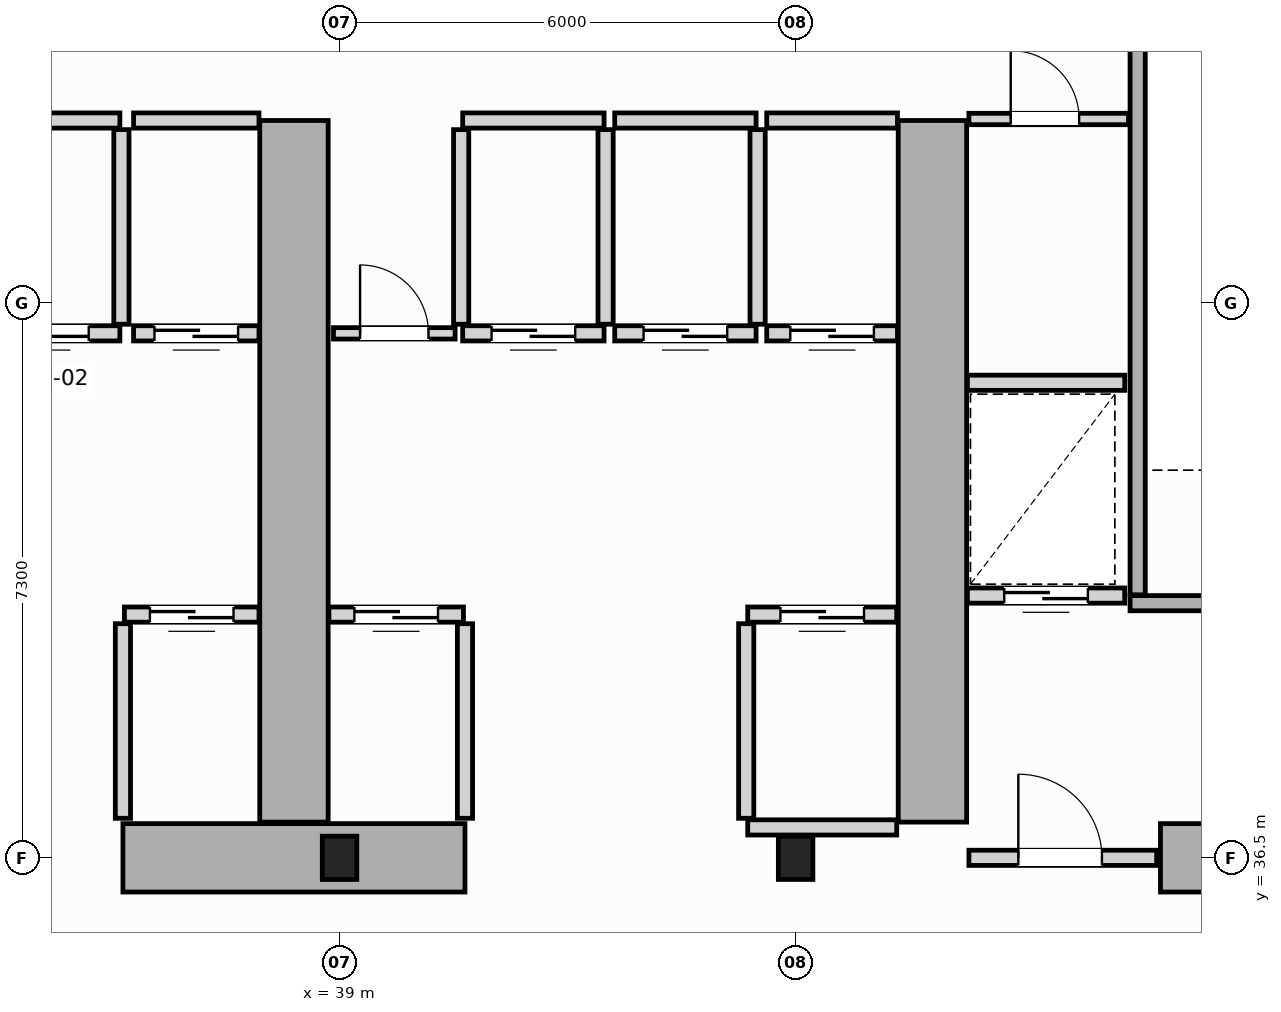
"""IFC4 building model, lengths in metres.
Left out: names, types, materials, properties, quantities, classifications, styles, units other than length and angle.
Written with IfcOpenShell. Run it as: python <this file> out.ifc"""

import sys

from ifc_helpers import new_model, si_unit, direction, frame, frame_2d, origin, origin_2d, place, context, subcontext, project, spatial, rectangle, i_section, extrude, source, transform, mapped, element, fill, save


model = new_model("IFC4")
c1 = context("Model", 3, precision=1e-05, world=origin(), true_north=direction((0.0, 1.0)))
c2 = subcontext(c1, "Body", "Model", "MODEL_VIEW")
j1 = project(units=[si_unit("LENGTHUNIT", "METRE"), si_unit("PLANEANGLEUNIT", "RADIAN")], contexts=[c1])
p1 = place(None, origin())
s1 = spatial("IfcSite", under=j1, at=p1, CompositionType="ELEMENT")
p2 = place(p1, origin())
s2 = spatial("IfcBuilding", under=s1, at=p2, CompositionType="ELEMENT")
p3 = place(p2, origin())
s3 = spatial("IfcBuildingStorey", under=s2, at=p3, CompositionType="ELEMENT", Elevation=0.0)
m1 = source(origin(), c2, "Body", "SweptSolid", [
    extrude(i_section(OverallWidth=0.454, OverallDepth=0.569, WebThickness=0.078, FlangeThickness=0.08, FilletRadius=0.015, at=origin_2d()), origin(), (0.0, 0.0, 1.0), 5.6),
])
for number, where, z_axis, x_axis in (
    (1, (39.0, 36.5, 0.0), (0.0, 0.0, 1.0), (1.0, 0.0, 0.0)),
    (2, (45.0, 36.5, 0.0), (0.0, 0.0, 1.0), (1.0, 0.0, 0.0)),
):
    element("IfcColumn", number, at=place(p3, frame(where, z_axis=z_axis, x_axis=x_axis)), inside=s3, PredefinedType="COLUMN", context=c2, shape_type="MappedRepresentation", body=[
        mapped(m1, transform((0.0, 0.0, 0.0), scale=1.0)),
    ])
p4 = place(p3, frame((36.15, 36.5, 0.0), z_axis=(0.0, 0.0, 1.0), x_axis=(1.0, 0.0, 0.0)))
e3 = element("IfcWall", 3, at=p4, inside=s3, PredefinedType="SHEAR", context=c2, shape_type="SweptSolid", body=[
    extrude(rectangle(XDim=4.5, YDim=0.9, at=frame_2d((2.25, 0.0))), origin(), (0.0, 0.0, 1.0), 5.6),
])
p5 = place(p3, frame((49.8, 36.5, 0.0), z_axis=(0.0, 0.0, 1.0), x_axis=(1.0, 0.0, 0.0)))
e4 = element("IfcWall", 4, at=p5, inside=s3, PredefinedType="SHEAR", context=c2, shape_type="SweptSolid", body=[
    extrude(rectangle(XDim=3.73, YDim=0.9, at=frame_2d((1.865, 0.0))), origin(), (0.0, 0.0, 1.0), 4.12),
])
for number, where, z_axis, x_axis in (
    (5, (38.4, 36.97, 0.0), (0.0, 0.0, 1.0), (0.0, 1.0, 0.0)),
    (6, (46.8, 36.97, 0.0), (0.0, 0.0, 1.0), (0.0, 1.0, 0.0)),
):
    element("IfcWall", number, at=place(p3, frame(where, z_axis=z_axis, x_axis=x_axis)), inside=s3, PredefinedType="SHEAR", context=c2, shape_type="SweptSolid", body=[
        extrude(rectangle(XDim=9.23, YDim=0.9, at=frame_2d((4.615, 0.0))), origin(), (0.0, 0.0, 1.0), 5.6),
    ])
p6 = place(p3, frame((49.4, 39.85, 0.0), z_axis=(0.0, 0.0, 1.0), x_axis=(1.0, 0.0, 0.0)))
e7 = element("IfcWall", 7, at=p6, inside=s3, PredefinedType="SOLIDWALL", context=c2, shape_type="SweptSolid", body=[
    extrude(rectangle(XDim=4.15, YDim=0.2, at=frame_2d((2.075, 0.0))), origin(), (0.0, 0.0, 1.0), 5.6),
])
p7 = place(p6, frame((1.325, 0.0, 0.0)))
e8 = element("IfcOpeningElement", 8, at=p7, cuts=e7, PredefinedType="OPENING", context=c2, shape_type="SweptSolid", body=[
    extrude(rectangle(XDim=1.1, YDim=2.15, at=frame_2d((0.55, 1.075))), frame((0.0, 0.11, 0.0), z_axis=(0.0, -1.0, 0.0), x_axis=(1.0, 0.0, 0.0)), (0.0, 0.0, 1.0), 0.22),
])
p8 = place(p3, frame((49.5, 39.96, 0.0), z_axis=(0.0, 0.0, 1.0), x_axis=(0.0, 1.0, 0.0)))
e9 = element("IfcWall", 9, at=p8, inside=s3, PredefinedType="SOLIDWALL", context=c2, shape_type="SweptSolid", body=[
    extrude(rectangle(XDim=9.93, YDim=0.2, at=frame_2d((4.965, 0.0))), origin(), (0.0, 0.0, 1.0), 5.6),
])
p9 = place(p3, frame((47.28, 36.5, 0.0), z_axis=(0.0, 0.0, 1.0), x_axis=(1.0, 0.0, 0.0)))
e10 = element("IfcWall", 10, at=p9, inside=s3, PredefinedType="SOLIDWALL", context=c2, shape_type="SweptSolid", body=[
    extrude(rectangle(XDim=2.47, YDim=0.2, at=frame_2d((1.235, 0.0))), origin(), (0.0, 0.0, 1.0), 4.11),
])
p10 = place(p9, frame((0.65, 0.0, 0.0)))
e11 = element("IfcOpeningElement", 11, at=p10, cuts=e10, PredefinedType="OPENING", context=c2, shape_type="SweptSolid", body=[
    extrude(rectangle(XDim=1.1, YDim=2.15, at=frame_2d((0.55, 1.075))), frame((0.0, 0.11, 0.0), z_axis=(0.0, -1.0, 0.0), x_axis=(1.0, 0.0, 0.0)), (0.0, 0.0, 1.0), 0.22),
])
p11 = place(p3, frame((36.17, 39.7, 0.0), z_axis=(0.0, 0.0, 1.0), x_axis=(1.0, 0.0, 0.0)))
e12 = element("IfcWall", 12, at=p11, inside=s3, PredefinedType="SOLIDWALL", context=c2, shape_type="SweptSolid", body=[
    extrude(rectangle(XDim=1.77, YDim=0.2, at=frame_2d((0.885, 0.0))), origin(), (0.0, 0.0, 1.0), 5.32),
])
p12 = place(p11, frame((0.335, 0.0, 0.0)))
e13 = element("IfcOpeningElement", 13, at=p12, cuts=e12, PredefinedType="OPENING", context=c2, shape_type="SweptSolid", body=[
    extrude(rectangle(XDim=1.1, YDim=2.15, at=frame_2d((0.55, 1.075))), frame((0.0, 0.11, 0.0), z_axis=(0.0, -1.0, 0.0), x_axis=(1.0, 0.0, 0.0)), (0.0, 0.0, 1.0), 0.22),
])
p13 = place(p3, frame((36.15, 37.02, 0.0), z_axis=(0.0, 0.0, 1.0), x_axis=(0.0, 1.0, 0.0)))
e14 = element("IfcWall", 14, at=p13, inside=s3, PredefinedType="SOLIDWALL", context=c2, shape_type="SweptSolid", body=[
    extrude(rectangle(XDim=2.56, YDim=0.2, at=frame_2d((1.28, 0.0))), origin(), (0.0, 0.0, 1.0), 5.32),
])
p14 = place(p3, frame((34.19, 43.4, 0.0), z_axis=(0.0, 0.0, 1.0), x_axis=(1.0, 0.0, 0.0)))
e15 = element("IfcWall", 15, at=p14, inside=s3, PredefinedType="SOLIDWALL", context=c2, shape_type="SweptSolid", body=[
    extrude(rectangle(XDim=1.92, YDim=0.2, at=frame_2d((0.96, 0.0))), origin(), (0.0, 0.0, 1.0), 5.32),
])
p15 = place(p14, frame((0.41, 0.0, 0.0)))
e16 = element("IfcOpeningElement", 16, at=p15, cuts=e15, PredefinedType="OPENING", context=c2, shape_type="SweptSolid", body=[
    extrude(rectangle(XDim=1.1, YDim=2.15, at=frame_2d((0.55, 1.075))), frame((0.0, 0.11, 0.0), z_axis=(0.0, -1.0, 0.0), x_axis=(1.0, 0.0, 0.0)), (0.0, 0.0, 1.0), 0.22),
])
p16 = place(p3, frame((34.19, 46.2, 0.0), z_axis=(0.0, 0.0, 1.0), x_axis=(1.0, 0.0, 0.0)))
e17 = element("IfcWall", 17, at=p16, inside=s3, PredefinedType="SOLIDWALL", context=c2, shape_type="SweptSolid", body=[
    extrude(rectangle(XDim=1.92, YDim=0.2, at=frame_2d((0.96, 0.0))), origin(), (0.0, 0.0, 1.0), 5.32),
])
p17 = place(p3, frame((36.13, 43.52, 0.0), z_axis=(0.0, 0.0, 1.0), x_axis=(0.0, 1.0, 0.0)))
e18 = element("IfcWall", 18, at=p17, inside=s3, PredefinedType="SOLIDWALL", context=c2, shape_type="SweptSolid", body=[
    extrude(rectangle(XDim=2.56, YDim=0.2, at=frame_2d((1.28, 0.0))), origin(), (0.0, 0.0, 1.0), 5.32),
])
p18 = place(p3, frame((36.29, 43.4, 0.0), z_axis=(0.0, 0.0, 1.0), x_axis=(1.0, 0.0, 0.0)))
e19 = element("IfcWall", 19, at=p18, inside=s3, PredefinedType="SOLIDWALL", context=c2, shape_type="SweptSolid", body=[
    extrude(rectangle(XDim=1.65, YDim=0.2, at=frame_2d((0.825, 0.0))), origin(), (0.0, 0.0, 1.0), 5.32),
])
p19 = place(p18, frame((0.275, 0.0, 0.0)))
e20 = element("IfcOpeningElement", 20, at=p19, cuts=e19, PredefinedType="OPENING", context=c2, shape_type="SweptSolid", body=[
    extrude(rectangle(XDim=1.1, YDim=2.15, at=frame_2d((0.55, 1.075))), frame((0.0, 0.11, 0.0), z_axis=(0.0, -1.0, 0.0), x_axis=(1.0, 0.0, 0.0)), (0.0, 0.0, 1.0), 0.22),
])
p20 = place(p3, frame((36.29, 46.2, 0.0), z_axis=(0.0, 0.0, 1.0), x_axis=(1.0, 0.0, 0.0)))
e21 = element("IfcWall", 21, at=p20, inside=s3, PredefinedType="SOLIDWALL", context=c2, shape_type="SweptSolid", body=[
    extrude(rectangle(XDim=1.65, YDim=0.2, at=frame_2d((0.825, 0.0))), origin(), (0.0, 0.0, 1.0), 5.32),
])
p21 = place(p3, frame((38.86, 39.7, 0.0), z_axis=(0.0, 0.0, 1.0), x_axis=(1.0, 0.0, 0.0)))
e22 = element("IfcWall", 22, at=p21, inside=s3, PredefinedType="SOLIDWALL", context=c2, shape_type="SweptSolid", body=[
    extrude(rectangle(XDim=1.77, YDim=0.2, at=frame_2d((0.885, 0.0))), origin(), (0.0, 0.0, 1.0), 5.32),
])
p22 = place(p21, frame((0.335, 0.0, 0.0)))
e23 = element("IfcOpeningElement", 23, at=p22, cuts=e22, PredefinedType="OPENING", context=c2, shape_type="SweptSolid", body=[
    extrude(rectangle(XDim=1.1, YDim=2.15, at=frame_2d((0.55, 1.075))), frame((0.0, 0.11, 0.0), z_axis=(0.0, -1.0, 0.0), x_axis=(1.0, 0.0, 0.0)), (0.0, 0.0, 1.0), 0.22),
])
p23 = place(p3, frame((40.65, 37.02, 0.0), z_axis=(0.0, 0.0, 1.0), x_axis=(0.0, 1.0, 0.0)))
e24 = element("IfcWall", 24, at=p23, inside=s3, PredefinedType="SOLIDWALL", context=c2, shape_type="SweptSolid", body=[
    extrude(rectangle(XDim=2.56, YDim=0.2, at=frame_2d((1.28, 0.0))), origin(), (0.0, 0.0, 1.0), 5.32),
])
p24 = place(p3, frame((44.37, 39.7, 0.0), z_axis=(0.0, 0.0, 1.0), x_axis=(1.0, 0.0, 0.0)))
e25 = element("IfcWall", 25, at=p24, inside=s3, PredefinedType="SOLIDWALL", context=c2, shape_type="SweptSolid", body=[
    extrude(rectangle(XDim=1.96, YDim=0.2, at=frame_2d((0.98, 0.0))), origin(), (0.0, 0.0, 1.0), 5.32),
])
p25 = place(p24, frame((0.43, 0.0, 0.0)))
e26 = element("IfcOpeningElement", 26, at=p25, cuts=e25, PredefinedType="OPENING", context=c2, shape_type="SweptSolid", body=[
    extrude(rectangle(XDim=1.1, YDim=2.15, at=frame_2d((0.55, 1.075))), frame((0.0, 0.11, 0.0), z_axis=(0.0, -1.0, 0.0), x_axis=(1.0, 0.0, 0.0)), (0.0, 0.0, 1.0), 0.22),
])
p26 = place(p3, frame((44.37, 36.9, 0.0), z_axis=(0.0, 0.0, 1.0), x_axis=(1.0, 0.0, 0.0)))
e27 = element("IfcWall", 27, at=p26, inside=s3, PredefinedType="SOLIDWALL", context=c2, shape_type="SweptSolid", body=[
    extrude(rectangle(XDim=1.96, YDim=0.2, at=frame_2d((0.98, 0.0))), origin(), (0.0, 0.0, 1.0), 4.11),
])
p27 = place(p3, frame((44.35, 37.02, 0.0), z_axis=(0.0, 0.0, 1.0), x_axis=(0.0, 1.0, 0.0)))
e28 = element("IfcWall", 28, at=p27, inside=s3, PredefinedType="SOLIDWALL", context=c2, shape_type="SweptSolid", body=[
    extrude(rectangle(XDim=2.56, YDim=0.2, at=frame_2d((1.28, 0.0))), origin(), (0.0, 0.0, 1.0), 5.32),
])
p28 = place(p3, frame((40.62, 43.4, 0.0), z_axis=(0.0, 0.0, 1.0), x_axis=(1.0, 0.0, 0.0)))
e29 = element("IfcWall", 29, at=p28, inside=s3, PredefinedType="SOLIDWALL", context=c2, shape_type="SweptSolid", body=[
    extrude(rectangle(XDim=1.86, YDim=0.2, at=frame_2d((0.93, 0.0))), origin(), (0.0, 0.0, 1.0), 5.32),
])
p29 = place(p28, frame((0.38, 0.0, 0.0)))
e30 = element("IfcOpeningElement", 30, at=p29, cuts=e29, PredefinedType="OPENING", context=c2, shape_type="SweptSolid", body=[
    extrude(rectangle(XDim=1.1, YDim=2.15, at=frame_2d((0.55, 1.075))), frame((0.0, 0.11, 0.0), z_axis=(0.0, -1.0, 0.0), x_axis=(1.0, 0.0, 0.0)), (0.0, 0.0, 1.0), 0.22),
])
p30 = place(p3, frame((40.62, 46.2, 0.0), z_axis=(0.0, 0.0, 1.0), x_axis=(1.0, 0.0, 0.0)))
e31 = element("IfcWall", 31, at=p30, inside=s3, PredefinedType="SOLIDWALL", context=c2, shape_type="SweptSolid", body=[
    extrude(rectangle(XDim=1.86, YDim=0.2, at=frame_2d((0.93, 0.0))), origin(), (0.0, 0.0, 1.0), 5.32),
])
for number, where, z_axis, x_axis in (
    (32, (40.6, 43.52, 0.0), (0.0, 0.0, 1.0), (0.0, 1.0, 0.0)),
    (33, (42.5, 43.52, 0.0), (0.0, 0.0, 1.0), (0.0, 1.0, 0.0)),
):
    element("IfcWall", number, at=place(p3, frame(where, z_axis=z_axis, x_axis=x_axis)), inside=s3, PredefinedType="SOLIDWALL", context=c2, shape_type="SweptSolid", body=[
        extrude(rectangle(XDim=2.56, YDim=0.2, at=frame_2d((1.28, 0.0))), origin(), (0.0, 0.0, 1.0), 5.32),
    ])
p31 = place(p3, frame((42.62, 43.4, 0.0), z_axis=(0.0, 0.0, 1.0), x_axis=(1.0, 0.0, 0.0)))
e34 = element("IfcWall", 34, at=p31, inside=s3, PredefinedType="SOLIDWALL", context=c2, shape_type="SweptSolid", body=[
    extrude(rectangle(XDim=1.86, YDim=0.2, at=frame_2d((0.93, 0.0))), origin(), (0.0, 0.0, 1.0), 5.32),
])
p32 = place(p31, frame((0.38, 0.0, 0.0)))
e35 = element("IfcOpeningElement", 35, at=p32, cuts=e34, PredefinedType="OPENING", context=c2, shape_type="SweptSolid", body=[
    extrude(rectangle(XDim=1.1, YDim=2.15, at=frame_2d((0.55, 1.075))), frame((0.0, 0.11, 0.0), z_axis=(0.0, -1.0, 0.0), x_axis=(1.0, 0.0, 0.0)), (0.0, 0.0, 1.0), 0.22),
])
p33 = place(p3, frame((42.62, 46.2, 0.0), z_axis=(0.0, 0.0, 1.0), x_axis=(1.0, 0.0, 0.0)))
e36 = element("IfcWall", 36, at=p33, inside=s3, PredefinedType="SOLIDWALL", context=c2, shape_type="SweptSolid", body=[
    extrude(rectangle(XDim=1.86, YDim=0.2, at=frame_2d((0.93, 0.0))), origin(), (0.0, 0.0, 1.0), 5.32),
])
p34 = place(p3, frame((44.5, 43.52, 0.0), z_axis=(0.0, 0.0, 1.0), x_axis=(0.0, 1.0, 0.0)))
e37 = element("IfcWall", 37, at=p34, inside=s3, PredefinedType="SOLIDWALL", context=c2, shape_type="SweptSolid", body=[
    extrude(rectangle(XDim=2.56, YDim=0.2, at=frame_2d((1.28, 0.0))), origin(), (0.0, 0.0, 1.0), 5.32),
])
p35 = place(p3, frame((44.62, 43.4, 0.0), z_axis=(0.0, 0.0, 1.0), x_axis=(1.0, 0.0, 0.0)))
e38 = element("IfcWall", 38, at=p35, inside=s3, PredefinedType="SOLIDWALL", context=c2, shape_type="SweptSolid", body=[
    extrude(rectangle(XDim=1.72, YDim=0.2, at=frame_2d((0.86, 0.0))), origin(), (0.0, 0.0, 1.0), 5.32),
])
p36 = place(p35, frame((0.31, 0.0, 0.0)))
e39 = element("IfcOpeningElement", 39, at=p36, cuts=e38, PredefinedType="OPENING", context=c2, shape_type="SweptSolid", body=[
    extrude(rectangle(XDim=1.1, YDim=2.15, at=frame_2d((0.55, 1.075))), frame((0.0, 0.11, 0.0), z_axis=(0.0, -1.0, 0.0), x_axis=(1.0, 0.0, 0.0)), (0.0, 0.0, 1.0), 0.22),
])
p37 = place(p3, frame((44.62, 46.2, 0.0), z_axis=(0.0, 0.0, 1.0), x_axis=(1.0, 0.0, 0.0)))
e40 = element("IfcWall", 40, at=p37, inside=s3, PredefinedType="SOLIDWALL", context=c2, shape_type="SweptSolid", body=[
    extrude(rectangle(XDim=1.72, YDim=0.2, at=frame_2d((0.86, 0.0))), origin(), (0.0, 0.0, 1.0), 5.32),
])
p38 = place(p3, frame((47.26, 39.95, 0.0), z_axis=(0.0, 0.0, 1.0), x_axis=(1.0, 0.0, 0.0)))
e41 = element("IfcWall", 41, at=p38, inside=s3, PredefinedType="SOLIDWALL", context=c2, shape_type="SweptSolid", body=[
    extrude(rectangle(XDim=2.07, YDim=0.2, at=frame_2d((1.035, 0.0))), origin(), (0.0, 0.0, 1.0), 5.32),
])
p39 = place(p38, frame((0.485, 0.0, 0.0)))
e42 = element("IfcOpeningElement", 42, at=p39, cuts=e41, PredefinedType="OPENING", context=c2, shape_type="SweptSolid", body=[
    extrude(rectangle(XDim=1.1, YDim=2.15, at=frame_2d((0.55, 1.075))), frame((0.0, 0.11, 0.0), z_axis=(0.0, -1.0, 0.0), x_axis=(1.0, 0.0, 0.0)), (0.0, 0.0, 1.0), 0.22),
])
p40 = place(p3, frame((47.26, 42.75, 0.0), z_axis=(0.0, 0.0, 1.0), x_axis=(1.0, 0.0, 0.0)))
e43 = element("IfcWall", 43, at=p40, inside=s3, PredefinedType="SOLIDWALL", context=c2, shape_type="SweptSolid", body=[
    extrude(rectangle(XDim=2.07, YDim=0.2, at=frame_2d((1.035, 0.0))), origin(), (0.0, 0.0, 1.0), 5.32),
])
p41 = place(p3, frame((47.28, 46.22, 0.0), z_axis=(0.0, 0.0, 1.0), x_axis=(1.0, 0.0, 0.0)))
e44 = element("IfcWall", 44, at=p41, inside=s3, PredefinedType="PARTITIONING", context=c2, shape_type="SweptSolid", body=[
    extrude(rectangle(XDim=2.1, YDim=0.15, at=frame_2d((1.05, 0.0))), origin(), (0.0, 0.0, 1.0), 5.32),
])
p42 = place(p41, frame((0.55, 0.0, 0.0)))
e45 = element("IfcOpeningElement", 45, at=p42, cuts=e44, PredefinedType="OPENING", context=c2, shape_type="SweptSolid", body=[
    extrude(rectangle(XDim=0.9, YDim=2.1, at=frame_2d((0.45, 1.05))), frame((0.0, 0.085, 0.0), z_axis=(0.0, -1.0, 0.0), x_axis=(1.0, 0.0, 0.0)), (0.0, 0.0, 1.0), 0.17),
])
p43 = place(p3, frame((38.92, 43.4, 0.0), z_axis=(0.0, 0.0, 1.0), x_axis=(1.0, 0.0, 0.0)))
e46 = element("IfcWall", 46, at=p43, inside=s3, PredefinedType="PARTITIONING", context=c2, shape_type="SweptSolid", body=[
    extrude(rectangle(XDim=1.6, YDim=0.15, at=frame_2d((0.8, 0.0))), origin(), (0.0, 0.0, 1.0), 5.32),
])
p44 = place(p43, frame((0.35, 0.0, 0.0)))
e47 = element("IfcOpeningElement", 47, at=p44, cuts=e46, PredefinedType="OPENING", context=c2, shape_type="SweptSolid", body=[
    extrude(rectangle(XDim=0.9, YDim=2.1, at=frame_2d((0.45, 1.05))), frame((0.0, 0.085, 0.0), z_axis=(0.0, -1.0, 0.0), x_axis=(1.0, 0.0, 0.0)), (0.0, 0.0, 1.0), 0.17),
])
m2 = source(origin(), c2, "Body", "SweptSolid", [
    extrude(rectangle(XDim=1.1, YDim=2.15, at=frame_2d((0.55, 1.075))), frame((0.0, 0.025, 0.0), z_axis=(0.0, -1.0, 0.0), x_axis=(1.0, 0.0, 0.0)), (0.0, 0.0, 1.0), 0.05),
])
p45 = place(p10, origin())
e48 = element("IfcDoor", 48, at=p45, inside=s3, OperationType="SINGLE_SWING_LEFT", PredefinedType="DOOR", context=c2, shape_type="MappedRepresentation", body=[
    mapped(m2, transform((0.0, 0.0, 0.0), scale=1.0)),
])
fill(e11, e48)
p46 = place(p12, origin())
e49 = element("IfcDoor", 49, at=p46, inside=s3, OperationType="DOUBLE_DOOR_SLIDING", PredefinedType="DOOR", context=c2, shape_type="MappedRepresentation", body=[
    mapped(m2, transform((0.0, 0.0, 0.0), scale=1.0)),
])
fill(e13, e49)
p47 = place(p15, origin())
e50 = element("IfcDoor", 50, at=p47, inside=s3, OperationType="DOUBLE_DOOR_SLIDING", PredefinedType="DOOR", context=c2, shape_type="MappedRepresentation", body=[
    mapped(m2, transform((0.0, 0.0, 0.0), scale=1.0)),
])
fill(e16, e50)
p48 = place(p19, origin())
e51 = element("IfcDoor", 51, at=p48, inside=s3, OperationType="DOUBLE_DOOR_SLIDING", PredefinedType="DOOR", context=c2, shape_type="MappedRepresentation", body=[
    mapped(m2, transform((0.0, 0.0, 0.0), scale=1.0)),
])
fill(e20, e51)
p49 = place(p22, origin())
e52 = element("IfcDoor", 52, at=p49, inside=s3, OperationType="DOUBLE_DOOR_SLIDING", PredefinedType="DOOR", context=c2, shape_type="MappedRepresentation", body=[
    mapped(m2, transform((0.0, 0.0, 0.0), scale=1.0)),
])
fill(e23, e52)
p50 = place(p25, origin())
e53 = element("IfcDoor", 53, at=p50, inside=s3, OperationType="DOUBLE_DOOR_SLIDING", PredefinedType="DOOR", context=c2, shape_type="MappedRepresentation", body=[
    mapped(m2, transform((0.0, 0.0, 0.0), scale=1.0)),
])
fill(e26, e53)
p51 = place(p29, origin())
e54 = element("IfcDoor", 54, at=p51, inside=s3, OperationType="DOUBLE_DOOR_SLIDING", PredefinedType="DOOR", context=c2, shape_type="MappedRepresentation", body=[
    mapped(m2, transform((0.0, 0.0, 0.0), scale=1.0)),
])
fill(e30, e54)
p52 = place(p32, origin())
e55 = element("IfcDoor", 55, at=p52, inside=s3, OperationType="DOUBLE_DOOR_SLIDING", PredefinedType="DOOR", context=c2, shape_type="MappedRepresentation", body=[
    mapped(m2, transform((0.0, 0.0, 0.0), scale=1.0)),
])
fill(e35, e55)
p53 = place(p36, origin())
e56 = element("IfcDoor", 56, at=p53, inside=s3, OperationType="DOUBLE_DOOR_SLIDING", PredefinedType="DOOR", context=c2, shape_type="MappedRepresentation", body=[
    mapped(m2, transform((0.0, 0.0, 0.0), scale=1.0)),
])
fill(e39, e56)
p54 = place(p39, origin())
e57 = element("IfcDoor", 57, at=p54, inside=s3, OperationType="DOUBLE_DOOR_SLIDING", PredefinedType="DOOR", context=c2, shape_type="MappedRepresentation", body=[
    mapped(m2, transform((0.0, 0.0, 0.0), scale=1.0)),
])
fill(e42, e57)
m3 = source(origin(), c2, "Body", "SweptSolid", [
    extrude(rectangle(XDim=0.9, YDim=2.1, at=frame_2d((0.45, 1.05))), frame((0.0, 0.025, 0.0), z_axis=(0.0, -1.0, 0.0), x_axis=(1.0, 0.0, 0.0)), (0.0, 0.0, 1.0), 0.05),
])
p55 = place(p42, origin())
e58 = element("IfcDoor", 58, at=p55, inside=s3, OperationType="SINGLE_SWING_RIGHT", PredefinedType="DOOR", context=c2, shape_type="MappedRepresentation", body=[
    mapped(m3, transform((0.0, 0.0, 0.0), scale=1.0)),
])
fill(e45, e58)
p56 = place(p44, origin())
e59 = element("IfcDoor", 59, at=p56, inside=s3, OperationType="SINGLE_SWING_LEFT", PredefinedType="DOOR", context=c2, shape_type="MappedRepresentation", body=[
    mapped(m3, transform((0.0, 0.0, 0.0), scale=1.0)),
])
fill(e47, e59)
save(model, sys.argv[1])
